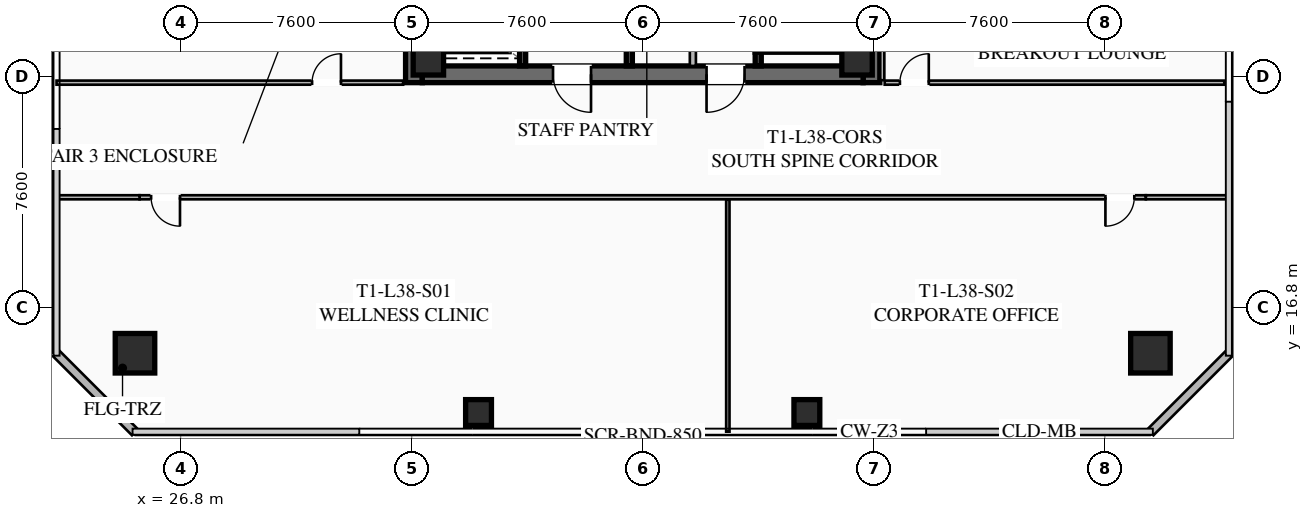
"""IFC4 building model, lengths in metres.
Left out: names, types, materials, properties, quantities, classifications, styles, units other than length and angle.
Written with IfcOpenShell. Run it as: python <this file> out.ifc"""

import sys

from ifc_helpers import new_model, si_unit, direction, frame, frame_2d, origin, origin_2d, place, context, subcontext, project, spatial, rectangle, hollow_rectangle, extrude, element, fill, save


model = new_model("IFC4")
c1 = context("Model", 3, precision=1e-05, world=origin(), true_north=direction((0.0, 1.0)))
c2 = subcontext(c1, "Body", "Model", "MODEL_VIEW")
j1 = project(units=[si_unit("LENGTHUNIT", "METRE"), si_unit("PLANEANGLEUNIT", "RADIAN")], contexts=[c1])
p1 = place(None, origin())
s1 = spatial("IfcSite", under=j1, at=p1, CompositionType="ELEMENT")
p2 = place(p1, origin())
s2 = spatial("IfcBuilding", under=s1, at=p2, CompositionType="ELEMENT")
p3 = place(p2, frame((0.0, 0.0, 142.8)))
s3 = spatial("IfcBuildingStorey", under=s2, at=p3, CompositionType="ELEMENT", Elevation=142.8)
for number, where, z_axis, x_axis in (
    (1, (34.475, 24.2, 0.0), (0.0, 0.0, 1.0), (0.0, 1.0, 0.0)),
    (2, (49.525, 39.8, 0.0), (0.0, 0.0, 1.0), (0.0, -1.0, 0.0)),
):
    element("IfcWall", number, at=place(p3, frame(where, z_axis=z_axis, x_axis=x_axis)), inside=s3, PredefinedType="SHEAR", context=c2, shape_type="SweptSolid", body=[
        extrude(rectangle(XDim=15.6, YDim=0.55, at=frame_2d((7.8, 0.0))), origin(), (0.0, 0.0, 1.0), 3.55),
    ])
p4 = place(p3, frame((49.25, 24.475, 0.0), z_axis=(0.0, 0.0, 1.0), x_axis=(-1.0, 0.0, 0.0)))
e3 = element("IfcWall", 3, at=p4, inside=s3, PredefinedType="SHEAR", context=c2, shape_type="SweptSolid", body=[
    extrude(rectangle(XDim=14.5, YDim=0.55, at=frame_2d((7.25, 0.0))), origin(), (0.0, 0.0, 1.0), 3.55),
])
p5 = place(p4, frame((8.95, 0.0, 0.0)))
e4 = element("IfcOpeningElement", 4, at=p5, cuts=e3, PredefinedType="OPENING", context=c2, shape_type="SweptSolid", body=[
    extrude(rectangle(XDim=1.25, YDim=2.25, at=frame_2d((0.625, 1.125))), frame((0.0, 0.285, 0.0), z_axis=(0.0, -1.0, 0.0), x_axis=(1.0, 0.0, 0.0)), (0.0, 0.0, 1.0), 0.57),
])
p6 = place(p4, frame((3.9, 0.0, 0.0)))
e5 = element("IfcOpeningElement", 5, at=p6, cuts=e3, PredefinedType="OPENING", context=c2, shape_type="SweptSolid", body=[
    extrude(rectangle(XDim=1.25, YDim=2.25, at=frame_2d((0.625, 1.125))), frame((0.0, 0.285, 0.0), z_axis=(0.0, -1.0, 0.0), x_axis=(1.0, 0.0, 0.0)), (0.0, 0.0, 1.0), 0.57),
])
for number, where, z_axis, x_axis in (
    (6, (34.95, 24.95, 0.0), (0.0, 0.0, 1.0), (1.0, 0.0, 0.0)),
    (7, (49.05, 24.95, 0.0), (0.0, 0.0, 1.0), (1.0, 0.0, 0.0)),
):
    element("IfcColumn", number, at=place(p3, frame(where, z_axis=z_axis, x_axis=x_axis)), inside=s3, PredefinedType="COLUMN", context=c2, shape_type="SweptSolid", body=[
        extrude(hollow_rectangle(XDim=1.0, YDim=1.0, WallThickness=0.04, at=origin_2d()), origin(), (0.0, 0.0, 1.0), 3.37),
    ])
for number, where, z_axis, x_axis in (
    (8, (25.3, 15.3, 0.0), (0.0, 0.0, 1.0), (1.0, 0.0, 0.0)),
    (9, (58.7, 15.3, 0.0), (0.0, 0.0, 1.0), (1.0, 0.0, 0.0)),
):
    element("IfcColumn", number, at=place(p3, frame(where, z_axis=z_axis, x_axis=x_axis)), inside=s3, PredefinedType="COLUMN", context=c2, shape_type="SweptSolid", body=[
        extrude(hollow_rectangle(XDim=1.3, YDim=1.3, WallThickness=0.05, at=origin_2d()), origin(), (0.0, 0.0, 1.0), 3.37),
    ])
for number, where, z_axis, x_axis in (
    (10, (36.6, 13.35, 0.0), (0.0, 0.0, 1.0), (1.0, 0.0, 0.0)),
    (11, (47.4, 13.35, 0.0), (0.0, 0.0, 1.0), (1.0, 0.0, 0.0)),
):
    element("IfcColumn", number, at=place(p3, frame(where, z_axis=z_axis, x_axis=x_axis)), inside=s3, PredefinedType="COLUMN", context=c2, shape_type="SweptSolid", body=[
        extrude(hollow_rectangle(XDim=0.85, YDim=0.85, WallThickness=0.035, at=origin_2d()), origin(), (0.0, 0.0, 1.0), 3.37),
    ])
for number, where, z_axis, x_axis in (
    (12, (25.3, 12.7, 0.0), (0.0, 0.0, 1.0), (-0.707, 0.707, 0.0)),
    (13, (61.3, 15.3, 0.0), (0.0, 0.0, 1.0), (-0.707, -0.707, 0.0)),
):
    element("IfcWall", number, at=place(p3, frame(where, z_axis=z_axis, x_axis=x_axis)), inside=s3, PredefinedType="SOLIDWALL", context=c2, shape_type="SweptSolid", body=[
        extrude(rectangle(XDim=3.677, YDim=0.28, at=frame_2d((1.838, 0.0))), origin(), (0.0, 0.0, 1.0), 3.37),
    ])
p7 = place(p3, frame((45.8, 32.8, 0.0), z_axis=(0.0, 0.0, 1.0), x_axis=(0.0, -1.0, 0.0)))
e14 = element("IfcWall", 14, at=p7, inside=s3, PredefinedType="SHEAR", context=c2, shape_type="SweptSolid", body=[
    extrude(rectangle(XDim=8.05, YDim=0.2, at=frame_2d((4.025, 0.0))), origin(), (0.0, 0.0, 1.0), 3.37),
])
p8 = place(p7, frame((0.45, 0.0, 0.0)))
e15 = element("IfcOpeningElement", 15, at=p8, cuts=e14, PredefinedType="OPENING", context=c2, shape_type="SweptSolid", body=[
    extrude(rectangle(XDim=1.15, YDim=2.2, at=frame_2d((0.575, 1.1))), frame((0.0, 0.11, 0.0), z_axis=(0.0, -1.0, 0.0), x_axis=(1.0, 0.0, 0.0)), (0.0, 0.0, 1.0), 0.22),
])
p9 = place(p3, frame((41.56, 24.75, 0.0), z_axis=(0.0, 0.0, 1.0), x_axis=(0.0, 1.0, 0.0)))
e16 = element("IfcWall", 16, at=p9, inside=s3, PredefinedType="SHEAR", context=c2, shape_type="SweptSolid", body=[
    extrude(rectangle(XDim=14.5, YDim=0.2, at=frame_2d((7.25, 0.0))), origin(), (0.0, 0.0, 1.0), 3.37),
])
p10 = place(p3, frame((38.05, 24.75, 0.0), z_axis=(0.0, 0.0, 1.0), x_axis=(0.0, 1.0, 0.0)))
e17 = element("IfcWall", 17, at=p10, inside=s3, PredefinedType="SHEAR", context=c2, shape_type="SweptSolid", body=[
    extrude(rectangle(XDim=6.45, YDim=0.2, at=frame_2d((3.225, 0.0))), origin(), (0.0, 0.0, 1.0), 3.37),
])
p11 = place(p10, frame((4.875, 0.0, 0.0)))
e18 = element("IfcOpeningElement", 18, at=p11, cuts=e17, PredefinedType="OPENING", context=c2, shape_type="SweptSolid", body=[
    extrude(rectangle(XDim=1.3, YDim=2.25, at=frame_2d((0.65, 1.125))), frame((0.0, 0.11, 0.0), z_axis=(0.0, -1.0, 0.0), x_axis=(1.0, 0.0, 0.0)), (0.0, 0.0, 1.0), 0.22),
])
p12 = place(p10, frame((2.875, 0.0, 0.0)))
e19 = element("IfcOpeningElement", 19, at=p12, cuts=e17, PredefinedType="OPENING", context=c2, shape_type="SweptSolid", body=[
    extrude(rectangle(XDim=1.3, YDim=2.25, at=frame_2d((0.65, 1.125))), frame((0.0, 0.11, 0.0), z_axis=(0.0, -1.0, 0.0), x_axis=(1.0, 0.0, 0.0)), (0.0, 0.0, 1.0), 0.22),
])
p13 = place(p10, frame((0.675, 0.0, 0.0)))
e20 = element("IfcOpeningElement", 20, at=p13, cuts=e17, PredefinedType="OPENING", context=c2, shape_type="SweptSolid", body=[
    extrude(rectangle(XDim=1.3, YDim=2.25, at=frame_2d((0.65, 1.125))), frame((0.0, 0.11, 0.0), z_axis=(0.0, -1.0, 0.0), x_axis=(1.0, 0.0, 0.0)), (0.0, 0.0, 1.0), 0.22),
])
p14 = place(p3, frame((43.65, 24.75, 0.0), z_axis=(0.0, 0.0, 1.0), x_axis=(0.0, 1.0, 0.0)))
e21 = element("IfcWall", 21, at=p14, inside=s3, PredefinedType="SOLIDWALL", context=c2, shape_type="SweptSolid", body=[
    extrude(rectangle(XDim=6.9, YDim=0.2, at=frame_2d((3.45, 0.0))), origin(), (0.0, 0.0, 1.0), 2.723),
])
p15 = place(p14, frame((0.85, 0.0, 0.0)))
e22 = element("IfcOpeningElement", 22, at=p15, cuts=e21, PredefinedType="OPENING", context=c2, shape_type="SweptSolid", body=[
    extrude(rectangle(XDim=0.95, YDim=2.05, at=frame_2d((0.475, 1.025))), frame((0.0, 0.11, 0.0), z_axis=(0.0, -1.0, 0.0), x_axis=(1.0, 0.0, 0.0)), (0.0, 0.0, 1.0), 0.22),
])
p16 = place(p14, frame((4.8, 0.0, 0.0)))
e23 = element("IfcOpeningElement", 23, at=p16, cuts=e21, PredefinedType="OPENING", context=c2, shape_type="SweptSolid", body=[
    extrude(rectangle(XDim=1.05, YDim=2.2, at=frame_2d((0.525, 1.1))), frame((0.0, 0.11, 0.0), z_axis=(0.0, -1.0, 0.0), x_axis=(1.0, 0.0, 0.0)), (0.0, 0.0, 1.0), 0.22),
])
p17 = place(p3, frame((58.55, 20.43, 0.0), z_axis=(0.0, 0.0, 1.0), x_axis=(-1.0, 0.0, 0.0)))
e24 = element("IfcWall", 24, at=p17, inside=s3, PredefinedType="PARTITIONING", context=c2, shape_type="SweptSolid", body=[
    extrude(rectangle(XDim=33.1, YDim=0.135, at=frame_2d((16.55, 0.0))), origin(), (0.0, 0.0, 1.0), 2.723),
])
p18 = place(p17, frame((31.77, 0.0, 0.0)))
e25 = element("IfcOpeningElement", 25, at=p18, cuts=e24, PredefinedType="OPENING", context=c2, shape_type="SweptSolid", body=[
    extrude(rectangle(XDim=0.95, YDim=2.05, at=frame_2d((0.475, 1.025))), frame((0.0, 0.077, 0.0), z_axis=(0.0, -1.0, 0.0), x_axis=(1.0, 0.0, 0.0)), (0.0, 0.0, 1.0), 0.155),
])
p19 = place(p17, frame((0.38, 0.0, 0.0)))
e26 = element("IfcOpeningElement", 26, at=p19, cuts=e24, PredefinedType="OPENING", context=c2, shape_type="SweptSolid", body=[
    extrude(rectangle(XDim=0.95, YDim=2.05, at=frame_2d((0.475, 1.025))), frame((0.0, 0.077, 0.0), z_axis=(0.0, -1.0, 0.0), x_axis=(1.0, 0.0, 0.0)), (0.0, 0.0, 1.0), 0.155),
])
for number, where, z_axis, x_axis in (
    (27, (22.72, 20.43, 0.0), (0.0, 0.0, 1.0), (1.0, 0.0, 0.0)),
    (28, (58.55, 20.43, 0.0), (0.0, 0.0, 1.0), (1.0, 0.0, 0.0)),
):
    element("IfcWall", number, at=place(p3, frame(where, z_axis=z_axis, x_axis=x_axis)), inside=s3, PredefinedType="PARTITIONING", context=c2, shape_type="SweptSolid", body=[
        extrude(rectangle(XDim=2.73, YDim=0.135, at=frame_2d((1.365, 0.0))), origin(), (0.0, 0.0, 1.0), 2.723),
    ])
p20 = place(p3, frame((44.8, 12.72, 0.0), z_axis=(0.0, 0.0, 1.0), x_axis=(0.0, 1.0, 0.0)))
e29 = element("IfcWall", 29, at=p20, inside=s3, PredefinedType="PARTITIONING", context=c2, shape_type="SweptSolid", body=[
    extrude(rectangle(XDim=7.63, YDim=0.11, at=frame_2d((3.815, 0.0))), origin(), (0.0, 0.0, 1.0), 2.723),
])
p21 = place(p3, frame((49.88, 39.72, 0.0), z_axis=(0.0, 0.0, 1.0), x_axis=(0.0, -1.0, 0.0)))
e30 = element("IfcWall", 30, at=p21, inside=s3, PredefinedType="PARTITIONING", context=c2, shape_type="SweptSolid", body=[
    extrude(rectangle(XDim=15.44, YDim=0.135, at=frame_2d((7.72, 0.0))), origin(), (0.0, 0.0, 1.0), 2.723),
])
p22 = place(p3, frame((49.96, 24.2, 0.0), z_axis=(0.0, 0.0, 1.0), x_axis=(1.0, 0.0, 0.0)))
e31 = element("IfcWall", 31, at=p22, inside=s3, PredefinedType="PARTITIONING", context=c2, shape_type="SweptSolid", body=[
    extrude(rectangle(XDim=11.17, YDim=0.135, at=frame_2d((5.585, 0.0))), origin(), (0.0, 0.0, 1.0), 2.723),
])
p23 = place(p22, frame((0.5, 0.0, 0.0)))
e32 = element("IfcOpeningElement", 32, at=p23, cuts=e31, PredefinedType="OPENING", context=c2, shape_type="SweptSolid", body=[
    extrude(rectangle(XDim=0.95, YDim=2.05, at=frame_2d((0.475, 1.025))), frame((0.0, 0.077, 0.0), z_axis=(0.0, -1.0, 0.0), x_axis=(1.0, 0.0, 0.0)), (0.0, 0.0, 1.0), 0.155),
])
p24 = place(p3, frame((22.72, 24.2, 0.0), z_axis=(0.0, 0.0, 1.0), x_axis=(1.0, 0.0, 0.0)))
e33 = element("IfcWall", 33, at=p24, inside=s3, PredefinedType="PARTITIONING", context=c2, shape_type="SweptSolid", body=[
    extrude(rectangle(XDim=11.4, YDim=0.135, at=frame_2d((5.7, 0.0))), origin(), (0.0, 0.0, 1.0), 2.723),
])
p25 = place(p24, frame((8.405, 0.0, 0.0)))
e34 = element("IfcOpeningElement", 34, at=p25, cuts=e33, PredefinedType="OPENING", context=c2, shape_type="SweptSolid", body=[
    extrude(rectangle(XDim=0.95, YDim=2.05, at=frame_2d((0.475, 1.025))), frame((0.0, 0.077, 0.0), z_axis=(0.0, -1.0, 0.0), x_axis=(1.0, 0.0, 0.0)), (0.0, 0.0, 1.0), 0.155),
])
p26 = place(p5, origin())
e35 = element("IfcDoor", 35, at=p26, inside=s3, OperationType="SINGLE_SWING_LEFT", PredefinedType="DOOR", context=c2, shape_type="SweptSolid", body=[
    extrude(rectangle(XDim=1.25, YDim=2.25, at=frame_2d((0.625, 1.125))), frame((0.0, 0.025, 0.0), z_axis=(0.0, -1.0, 0.0), x_axis=(1.0, 0.0, 0.0)), (0.0, 0.0, 1.0), 0.05),
])
fill(e4, e35)
p27 = place(p6, origin())
e36 = element("IfcDoor", 36, at=p27, inside=s3, OperationType="SINGLE_SWING_RIGHT", PredefinedType="DOOR", context=c2, shape_type="SweptSolid", body=[
    extrude(rectangle(XDim=1.25, YDim=2.25, at=frame_2d((0.625, 1.125))), frame((0.0, 0.025, 0.0), z_axis=(0.0, -1.0, 0.0), x_axis=(1.0, 0.0, 0.0)), (0.0, 0.0, 1.0), 0.05),
])
fill(e5, e36)
p28 = place(p18, origin())
e37 = element("IfcDoor", 37, at=p28, inside=s3, OperationType="SINGLE_SWING_LEFT", PredefinedType="DOOR", context=c2, shape_type="SweptSolid", body=[
    extrude(rectangle(XDim=0.95, YDim=2.05, at=frame_2d((0.475, 1.025))), frame((0.0, 0.025, 0.0), z_axis=(0.0, -1.0, 0.0), x_axis=(1.0, 0.0, 0.0)), (0.0, 0.0, 1.0), 0.05),
])
fill(e25, e37)
p29 = place(p19, origin())
e38 = element("IfcDoor", 38, at=p29, inside=s3, OperationType="SINGLE_SWING_RIGHT", PredefinedType="DOOR", context=c2, shape_type="SweptSolid", body=[
    extrude(rectangle(XDim=0.95, YDim=2.05, at=frame_2d((0.475, 1.025))), frame((0.0, 0.025, 0.0), z_axis=(0.0, -1.0, 0.0), x_axis=(1.0, 0.0, 0.0)), (0.0, 0.0, 1.0), 0.05),
])
fill(e26, e38)
p30 = place(p23, origin())
e39 = element("IfcDoor", 39, at=p30, inside=s3, OperationType="SINGLE_SWING_RIGHT", PredefinedType="DOOR", context=c2, shape_type="SweptSolid", body=[
    extrude(rectangle(XDim=0.95, YDim=2.05, at=frame_2d((0.475, 1.025))), frame((0.0, 0.025, 0.0), z_axis=(0.0, -1.0, 0.0), x_axis=(1.0, 0.0, 0.0)), (0.0, 0.0, 1.0), 0.05),
])
fill(e32, e39)
p31 = place(p25, origin())
e40 = element("IfcDoor", 40, at=p31, inside=s3, OperationType="SINGLE_SWING_RIGHT", PredefinedType="DOOR", context=c2, shape_type="SweptSolid", body=[
    extrude(rectangle(XDim=0.95, YDim=2.05, at=frame_2d((0.475, 1.025))), frame((0.0, 0.025, 0.0), z_axis=(0.0, -1.0, 0.0), x_axis=(1.0, 0.0, 0.0)), (0.0, 0.0, 1.0), 0.05),
])
fill(e34, e40)
save(model, sys.argv[1])
